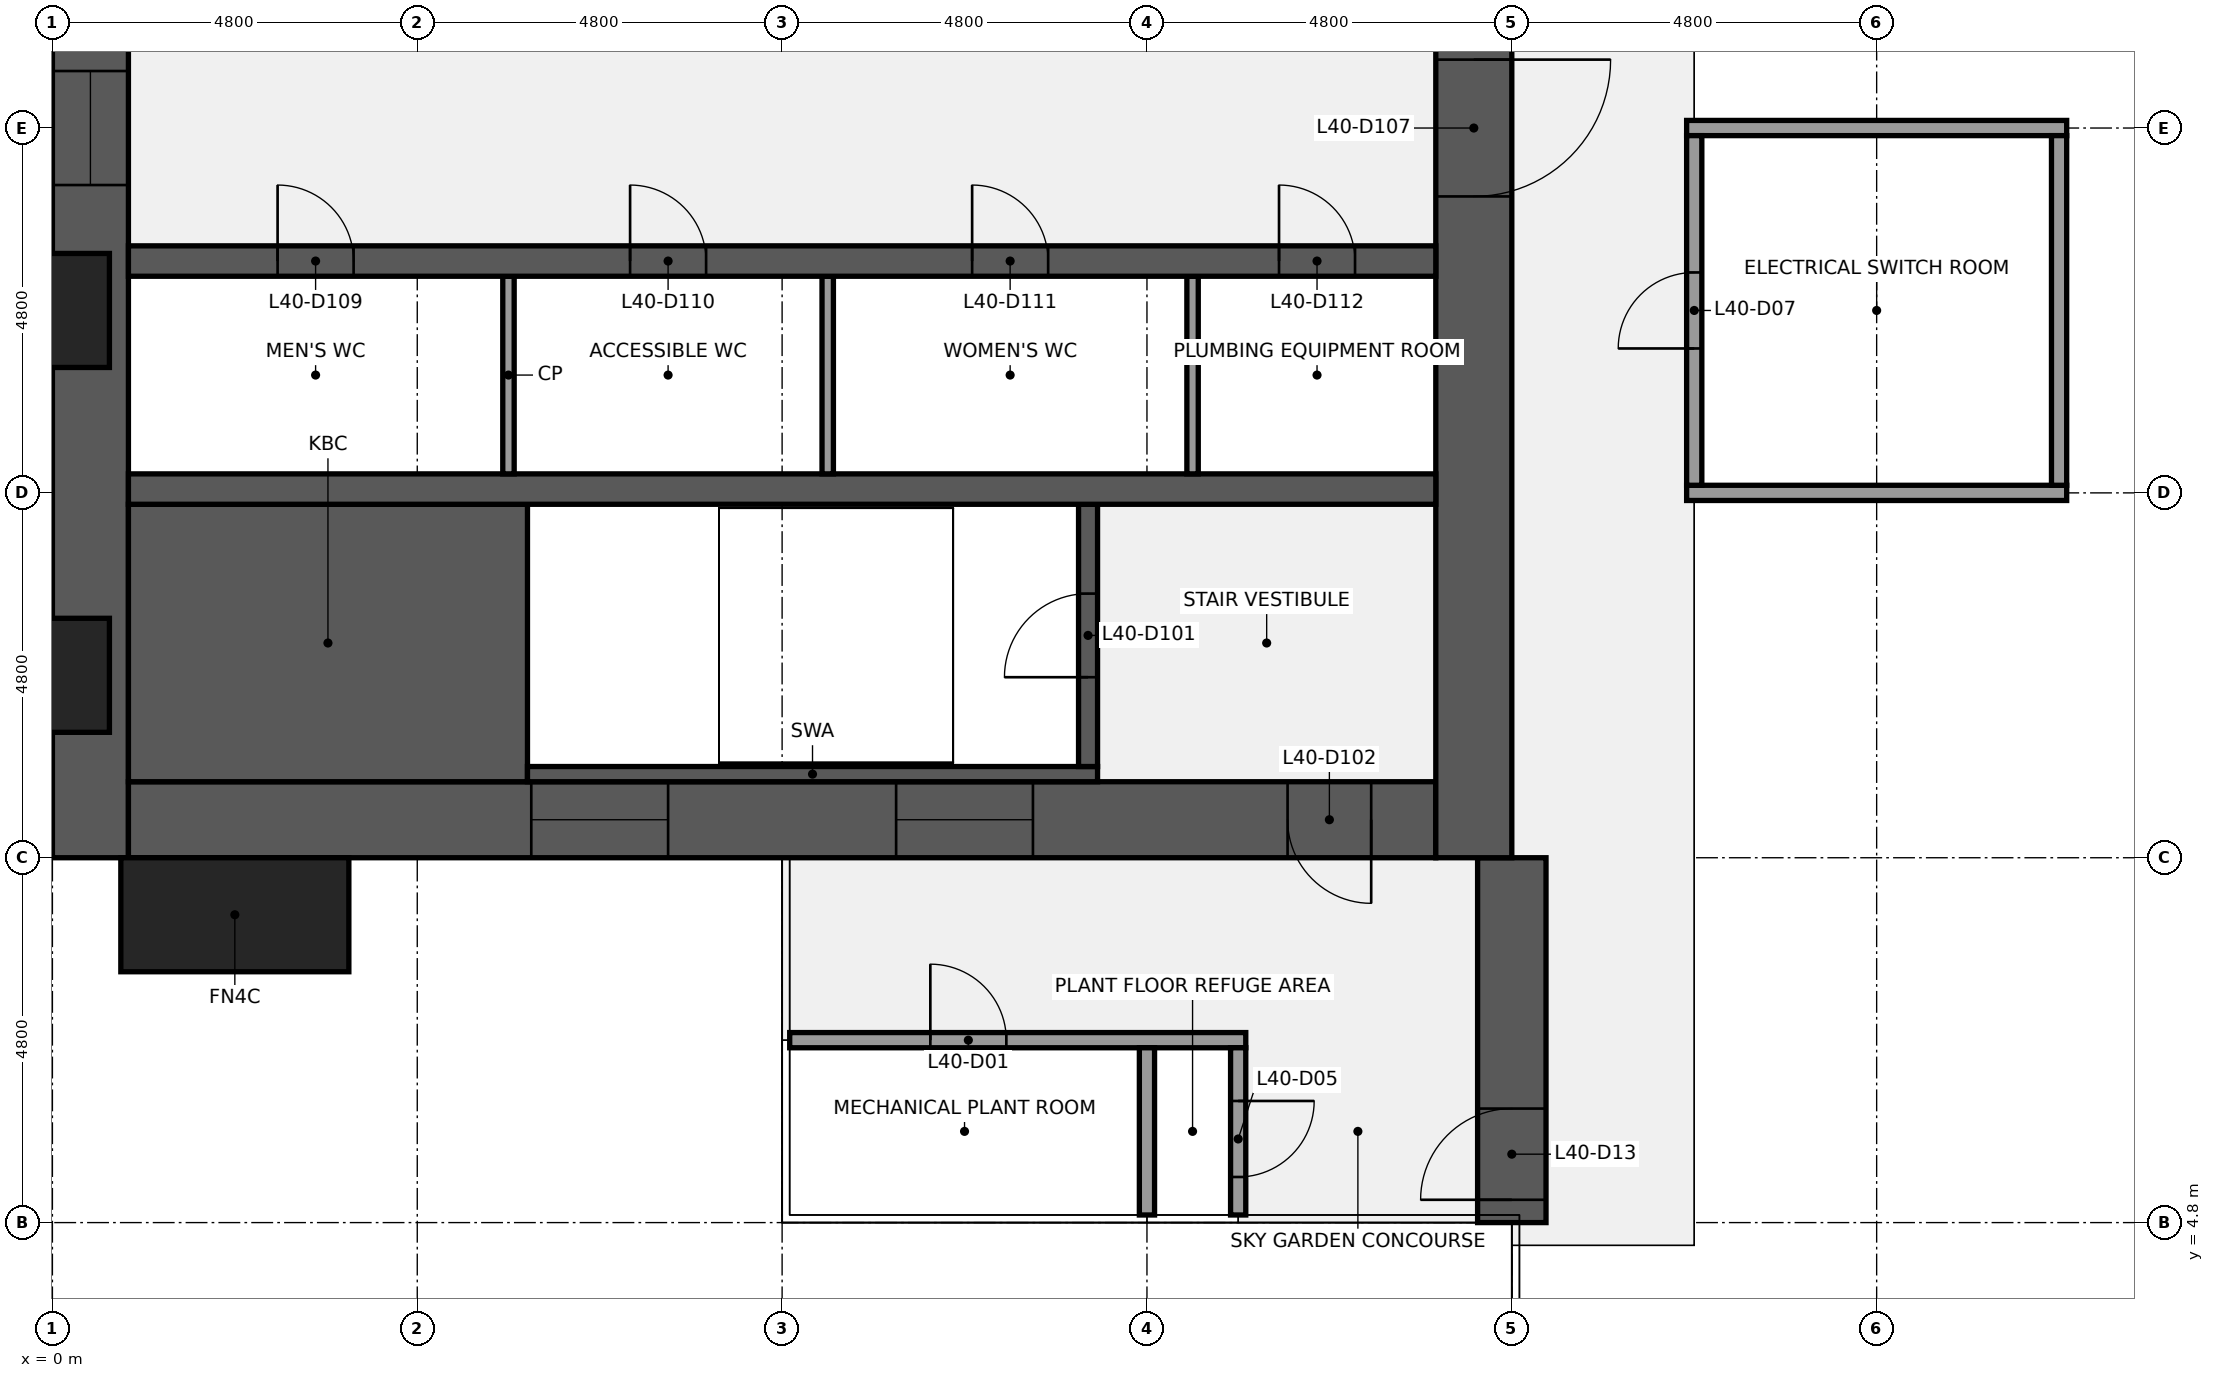
"""IFC4 building model, lengths in metres.
Left out: names, types, materials, properties, quantities, classifications, styles, units other than length and angle.
Written with IfcOpenShell. Run it as: python <this file> out.ifc"""

import sys

from ifc_helpers import new_model, si_unit, direction, frame, frame_2d, origin, origin_2d, place, context, subcontext, project, spatial, rectangle, extrude, element, fill, save


model = new_model("IFC4")
c1 = context("Model", 3, precision=1e-05, world=origin(), true_north=direction((0.0, 1.0)))
c2 = subcontext(c1, "Body", "Model", "MODEL_VIEW")
j1 = project(units=[si_unit("LENGTHUNIT", "METRE"), si_unit("PLANEANGLEUNIT", "RADIAN")], contexts=[c1])
p1 = place(None, origin())
s1 = spatial("IfcSite", under=j1, at=p1, CompositionType="ELEMENT")
p2 = place(p1, origin())
s2 = spatial("IfcBuilding", under=s1, at=p2, CompositionType="ELEMENT")
p3 = place(p2, frame((0.0, 0.0, 180.6)))
s3 = spatial("IfcBuildingStorey", under=s2, at=p3, CompositionType="ELEMENT", Elevation=180.6)
p4 = place(p3, frame((19.2, 4.8, 0.0), z_axis=(0.0, 0.0, 1.0), x_axis=(0.0, 1.0, 0.0)))
e1 = element("IfcWall", 1, at=p4, inside=s3, PredefinedType="SHEAR", context=c2, shape_type="SweptSolid", body=[
    extrude(rectangle(XDim=4.8, YDim=0.9, at=frame_2d((2.4, 0.0))), origin(), (0.0, 0.0, 1.0), 12.3),
])
p5 = place(p4, frame((0.3, 0.0, 0.0)))
e2 = element("IfcOpeningElement", 2, at=p5, cuts=e1, PredefinedType="OPENING", context=c2, shape_type="SweptSolid", body=[
    extrude(rectangle(XDim=1.2, YDim=2.1, at=frame_2d((0.6, 1.05))), frame((0.0, 0.46, 0.0), z_axis=(0.0, -1.0, 0.0), x_axis=(1.0, 0.0, 0.0)), (0.0, 0.0, 1.0), 0.92),
])
p6 = place(p3, frame((0.5, 9.6, 0.0), z_axis=(0.0, 0.0, 1.0), x_axis=(0.0, 1.0, 0.0)))
e3 = element("IfcWall", 3, at=p6, inside=s3, PredefinedType="SHEAR", context=c2, shape_type="SweptSolid", body=[
    extrude(rectangle(XDim=28.8, YDim=1.0, at=frame_2d((14.4, 0.0))), origin(), (0.0, 0.0, 1.0), 12.3),
])
p7 = place(p6, frame((8.85, 0.0, 0.9)))
e4 = element("IfcOpeningElement", 4, at=p7, cuts=e3, PredefinedType="OPENING", context=c2, shape_type="SweptSolid", body=[
    extrude(rectangle(XDim=1.5, YDim=6.3, at=frame_2d((0.75, 3.15))), frame((0.0, 0.51, 0.0), z_axis=(0.0, -1.0, 0.0), x_axis=(1.0, 0.0, 0.0)), (0.0, 0.0, 1.0), 1.02),
])
p8 = place(p6, frame((18.45, 0.0, 0.9)))
e5 = element("IfcOpeningElement", 5, at=p8, cuts=e3, PredefinedType="OPENING", context=c2, shape_type="SweptSolid", body=[
    extrude(rectangle(XDim=1.5, YDim=6.3, at=frame_2d((0.75, 3.15))), frame((0.0, 0.51, 0.0), z_axis=(0.0, -1.0, 0.0), x_axis=(1.0, 0.0, 0.0)), (0.0, 0.0, 1.0), 1.02),
])
p9 = place(p3, frame((18.2, 10.1, 0.0), z_axis=(0.0, 0.0, 1.0), x_axis=(-1.0, 0.0, 0.0)))
e6 = element("IfcWall", 6, at=p9, inside=s3, PredefinedType="SHEAR", context=c2, shape_type="SweptSolid", body=[
    extrude(rectangle(XDim=17.2, YDim=1.0, at=frame_2d((8.6, 0.0))), origin(), (0.0, 0.0, 1.0), 12.3),
])
p10 = place(p9, frame((0.85, 0.0, 0.0)))
e7 = element("IfcOpeningElement", 7, at=p10, cuts=e6, PredefinedType="OPENING", context=c2, shape_type="SweptSolid", body=[
    extrude(rectangle(XDim=1.1, YDim=2.1, at=frame_2d((0.55, 1.05))), frame((0.0, 0.51, 0.0), z_axis=(0.0, -1.0, 0.0), x_axis=(1.0, 0.0, 0.0)), (0.0, 0.0, 1.0), 1.02),
])
p11 = place(p9, frame((10.1, 0.0, 0.9)))
e8 = element("IfcOpeningElement", 8, at=p11, cuts=e6, PredefinedType="OPENING", context=c2, shape_type="SweptSolid", body=[
    extrude(rectangle(XDim=1.8, YDim=1.5, at=frame_2d((0.9, 0.75))), frame((0.0, 0.51, 0.0), z_axis=(0.0, -1.0, 0.0), x_axis=(1.0, 0.0, 0.0)), (0.0, 0.0, 1.0), 1.02),
])
p12 = place(p9, frame((5.3, 0.0, 0.9)))
e9 = element("IfcOpeningElement", 9, at=p12, cuts=e6, PredefinedType="OPENING", context=c2, shape_type="SweptSolid", body=[
    extrude(rectangle(XDim=1.8, YDim=1.5, at=frame_2d((0.9, 0.75))), frame((0.0, 0.51, 0.0), z_axis=(0.0, -1.0, 0.0), x_axis=(1.0, 0.0, 0.0)), (0.0, 0.0, 1.0), 1.02),
])
p13 = place(p3, frame((18.7, 38.4, 0.0), z_axis=(0.0, 0.0, 1.0), x_axis=(0.0, -1.0, 0.0)))
e10 = element("IfcWall", 10, at=p13, inside=s3, PredefinedType="SHEAR", context=c2, shape_type="SweptSolid", body=[
    extrude(rectangle(XDim=28.8, YDim=1.0, at=frame_2d((14.4, 0.0))), origin(), (0.0, 0.0, 1.0), 12.3),
])
p14 = place(p13, frame((18.3, 0.0, 0.0)))
e11 = element("IfcOpeningElement", 11, at=p14, cuts=e10, PredefinedType="OPENING", context=c2, shape_type="SweptSolid", body=[
    extrude(rectangle(XDim=1.8, YDim=2.1, at=frame_2d((0.9, 1.05))), frame((0.0, 0.51, 0.0), z_axis=(0.0, -1.0, 0.0), x_axis=(1.0, 0.0, 0.0)), (0.0, 0.0, 1.0), 1.02),
])
p15 = place(p13, frame((8.7, 0.0, 0.0)))
e12 = element("IfcOpeningElement", 12, at=p15, cuts=e10, PredefinedType="OPENING", context=c2, shape_type="SweptSolid", body=[
    extrude(rectangle(XDim=1.8, YDim=2.1, at=frame_2d((0.9, 1.05))), frame((0.0, 0.51, 0.0), z_axis=(0.0, -1.0, 0.0), x_axis=(1.0, 0.0, 0.0)), (0.0, 0.0, 1.0), 1.02),
])
p16 = place(p3, frame((1.0, 12.425, 0.0), z_axis=(0.0, 0.0, 1.0), x_axis=(1.0, 0.0, 0.0)))
e13 = element("IfcWall", 13, at=p16, inside=s3, PredefinedType="SHEAR", context=c2, shape_type="SweptSolid", body=[
    extrude(rectangle(XDim=5.25, YDim=3.65, at=frame_2d((2.625, 0.0))), origin(), (0.0, 0.0, 1.0), 12.3),
])
p17 = place(p3, frame((6.25, 10.7, 0.0), z_axis=(0.0, 0.0, 1.0), x_axis=(1.0, 0.0, 0.0)))
e14 = element("IfcWall", 14, at=p17, inside=s3, PredefinedType="SHEAR", context=c2, shape_type="SweptSolid", body=[
    extrude(rectangle(XDim=7.5, YDim=0.2, at=frame_2d((3.75, 0.0))), origin(), (0.0, 0.0, 1.0), 12.3),
])
p18 = place(p3, frame((13.625, 10.8, 0.0), z_axis=(0.0, 0.0, 1.0), x_axis=(0.0, 1.0, 0.0)))
e15 = element("IfcWall", 15, at=p18, inside=s3, PredefinedType="SHEAR", context=c2, shape_type="SweptSolid", body=[
    extrude(rectangle(XDim=3.45, YDim=0.25, at=frame_2d((1.725, 0.0))), origin(), (0.0, 0.0, 1.0), 12.3),
])
p19 = place(p18, frame((1.175, 0.0, 0.0)))
e16 = element("IfcOpeningElement", 16, at=p19, cuts=e15, PredefinedType="OPENING", context=c2, shape_type="SweptSolid", body=[
    extrude(rectangle(XDim=1.1, YDim=2.1, at=frame_2d((0.55, 1.05))), frame((0.0, 0.135, 0.0), z_axis=(0.0, -1.0, 0.0), x_axis=(1.0, 0.0, 0.0)), (0.0, 0.0, 1.0), 0.27),
])
p20 = place(p3, frame((1.0, 14.45, 0.0), z_axis=(0.0, 0.0, 1.0), x_axis=(1.0, 0.0, 0.0)))
e17 = element("IfcWall", 17, at=p20, inside=s3, PredefinedType="SHEAR", context=c2, shape_type="SweptSolid", body=[
    extrude(rectangle(XDim=17.2, YDim=0.4, at=frame_2d((8.6, 0.0))), origin(), (0.0, 0.0, 1.0), 12.3),
])
for number, where, z_axis, x_axis in (
    (18, (6.0, 14.65, 0.0), (0.0, 0.0, 1.0), (0.0, 1.0, 0.0)),
    (19, (10.2, 14.65, 0.0), (0.0, 0.0, 1.0), (0.0, 1.0, 0.0)),
    (20, (15.0, 14.65, 0.0), (0.0, 0.0, 1.0), (0.0, 1.0, 0.0)),
):
    element("IfcWall", number, at=place(p3, frame(where, z_axis=z_axis, x_axis=x_axis)), inside=s3, PredefinedType="PARTITIONING", context=c2, shape_type="SweptSolid", body=[
        extrude(rectangle(XDim=2.6, YDim=0.15, at=frame_2d((1.3, 0.0))), origin(), (0.0, 0.0, 1.0), 12.3),
    ])
p21 = place(p3, frame((1.0, 17.45, 0.0), z_axis=(0.0, 0.0, 1.0), x_axis=(1.0, 0.0, 0.0)))
e21 = element("IfcWall", 21, at=p21, inside=s3, PredefinedType="SHEAR", context=c2, shape_type="SweptSolid", body=[
    extrude(rectangle(XDim=17.2, YDim=0.4, at=frame_2d((8.6, 0.0))), origin(), (0.0, 0.0, 1.0), 12.3),
])
p22 = place(p21, frame((1.962, 0.0, 0.0)))
e22 = element("IfcOpeningElement", 22, at=p22, cuts=e21, PredefinedType="OPENING", context=c2, shape_type="SweptSolid", body=[
    extrude(rectangle(XDim=1.0, YDim=2.1, at=frame_2d((0.5, 1.05))), frame((0.0, 0.21, 0.0), z_axis=(0.0, -1.0, 0.0), x_axis=(1.0, 0.0, 0.0)), (0.0, 0.0, 1.0), 0.42),
])
p23 = place(p21, frame((6.6, 0.0, 0.0)))
e23 = element("IfcOpeningElement", 23, at=p23, cuts=e21, PredefinedType="OPENING", context=c2, shape_type="SweptSolid", body=[
    extrude(rectangle(XDim=1.0, YDim=2.1, at=frame_2d((0.5, 1.05))), frame((0.0, 0.21, 0.0), z_axis=(0.0, -1.0, 0.0), x_axis=(1.0, 0.0, 0.0)), (0.0, 0.0, 1.0), 0.42),
])
p24 = place(p21, frame((11.1, 0.0, 0.0)))
e24 = element("IfcOpeningElement", 24, at=p24, cuts=e21, PredefinedType="OPENING", context=c2, shape_type="SweptSolid", body=[
    extrude(rectangle(XDim=1.0, YDim=2.1, at=frame_2d((0.5, 1.05))), frame((0.0, 0.21, 0.0), z_axis=(0.0, -1.0, 0.0), x_axis=(1.0, 0.0, 0.0)), (0.0, 0.0, 1.0), 0.42),
])
p25 = place(p21, frame((15.137, 0.0, 0.0)))
e25 = element("IfcOpeningElement", 25, at=p25, cuts=e21, PredefinedType="OPENING", context=c2, shape_type="SweptSolid", body=[
    extrude(rectangle(XDim=1.0, YDim=2.1, at=frame_2d((0.5, 1.05))), frame((0.0, 0.21, 0.0), z_axis=(0.0, -1.0, 0.0), x_axis=(1.0, 0.0, 0.0)), (0.0, 0.0, 1.0), 0.42),
])
p26 = place(p3, frame((9.7, 7.2, 0.0), z_axis=(0.0, 0.0, 1.0), x_axis=(1.0, 0.0, 0.0)))
e26 = element("IfcWall", 26, at=p26, inside=s3, PredefinedType="PARTITIONING", context=c2, shape_type="SweptSolid", body=[
    extrude(rectangle(XDim=6.0, YDim=0.2, at=frame_2d((3.0, 0.0))), origin(), (0.0, 0.0, 1.0), 11.309),
])
p27 = place(p26, frame((1.85, 0.0, 0.0)))
e27 = element("IfcOpeningElement", 27, at=p27, cuts=e26, PredefinedType="OPENING", context=c2, shape_type="SweptSolid", body=[
    extrude(rectangle(XDim=1.0, YDim=2.1, at=frame_2d((0.5, 1.05))), frame((0.0, 0.11, 0.0), z_axis=(0.0, -1.0, 0.0), x_axis=(1.0, 0.0, 0.0)), (0.0, 0.0, 1.0), 0.22),
])
for number, where, z_axis, x_axis in (
    (28, (21.5, 14.4, 0.0), (0.0, 0.0, 1.0), (1.0, 0.0, 0.0)),
    (29, (21.5, 19.2, 0.0), (0.0, 0.0, 1.0), (1.0, 0.0, 0.0)),
):
    element("IfcWall", number, at=place(p3, frame(where, z_axis=z_axis, x_axis=x_axis)), inside=s3, PredefinedType="PARTITIONING", context=c2, shape_type="SweptSolid", body=[
        extrude(rectangle(XDim=5.0, YDim=0.2, at=frame_2d((2.5, 0.0))), origin(), (0.0, 0.0, 1.0), 11.309),
    ])
p28 = place(p3, frame((14.4, 4.9, 0.0), z_axis=(0.0, 0.0, 1.0), x_axis=(0.0, 1.0, 0.0)))
e30 = element("IfcWall", 30, at=p28, inside=s3, PredefinedType="PARTITIONING", context=c2, shape_type="SweptSolid", body=[
    extrude(rectangle(XDim=2.2, YDim=0.2, at=frame_2d((1.1, 0.0))), origin(), (0.0, 0.0, 1.0), 11.309),
])
p29 = place(p3, frame((15.6, 4.9, 0.0), z_axis=(0.0, 0.0, 1.0), x_axis=(0.0, 1.0, 0.0)))
e31 = element("IfcWall", 31, at=p29, inside=s3, PredefinedType="PARTITIONING", context=c2, shape_type="SweptSolid", body=[
    extrude(rectangle(XDim=2.2, YDim=0.2, at=frame_2d((1.1, 0.0))), origin(), (0.0, 0.0, 1.0), 11.309),
])
p30 = place(p29, frame((0.5, 0.0, 0.0)))
e32 = element("IfcOpeningElement", 32, at=p30, cuts=e31, PredefinedType="OPENING", context=c2, shape_type="SweptSolid", body=[
    extrude(rectangle(XDim=1.0, YDim=2.1, at=frame_2d((0.5, 1.05))), frame((0.0, 0.11, 0.0), z_axis=(0.0, -1.0, 0.0), x_axis=(1.0, 0.0, 0.0)), (0.0, 0.0, 1.0), 0.22),
])
p31 = place(p3, frame((21.6, 14.5, 0.0), z_axis=(0.0, 0.0, 1.0), x_axis=(0.0, 1.0, 0.0)))
e33 = element("IfcWall", 33, at=p31, inside=s3, PredefinedType="PARTITIONING", context=c2, shape_type="SweptSolid", body=[
    extrude(rectangle(XDim=4.6, YDim=0.2, at=frame_2d((2.3, 0.0))), origin(), (0.0, 0.0, 1.0), 11.309),
])
p32 = place(p31, frame((1.8, 0.0, 0.0)))
e34 = element("IfcOpeningElement", 34, at=p32, cuts=e33, PredefinedType="OPENING", context=c2, shape_type="SweptSolid", body=[
    extrude(rectangle(XDim=1.0, YDim=2.1, at=frame_2d((0.5, 1.05))), frame((0.0, 0.11, 0.0), z_axis=(0.0, -1.0, 0.0), x_axis=(1.0, 0.0, 0.0)), (0.0, 0.0, 1.0), 0.22),
])
p33 = place(p3, frame((26.4, 14.5, 0.0), z_axis=(0.0, 0.0, 1.0), x_axis=(0.0, 1.0, 0.0)))
e35 = element("IfcWall", 35, at=p33, inside=s3, PredefinedType="PARTITIONING", context=c2, shape_type="SweptSolid", body=[
    extrude(rectangle(XDim=4.6, YDim=0.2, at=frame_2d((2.3, 0.0))), origin(), (0.0, 0.0, 1.0), 11.309),
])
p34 = place(p3, frame((2.4, 8.85, 0.0), z_axis=(0.0, 0.0, 1.0), x_axis=(1.0, 0.0, 0.0)))
e36 = element("IfcColumn", 36, at=p34, inside=s3, PredefinedType="PILASTER", context=c2, shape_type="SweptSolid", body=[
    extrude(rectangle(XDim=3.0, YDim=1.5, at=origin_2d()), origin(), (0.0, 0.0, 1.0), 12.6),
])
p35 = place(p19, origin())
e37 = element("IfcDoor", 37, at=p35, inside=s3, OperationType="SINGLE_SWING_LEFT", PredefinedType="DOOR", context=c2, shape_type="SweptSolid", body=[
    extrude(rectangle(XDim=1.1, YDim=2.1, at=frame_2d((0.55, 1.05))), frame((0.0, 0.025, 0.0), z_axis=(0.0, -1.0, 0.0), x_axis=(1.0, 0.0, 0.0)), (0.0, 0.0, 1.0), 0.05),
])
fill(e16, e37)
p36 = place(p10, origin())
e38 = element("IfcDoor", 38, at=p36, inside=s3, OperationType="SINGLE_SWING_LEFT", PredefinedType="DOOR", context=c2, shape_type="SweptSolid", body=[
    extrude(rectangle(XDim=1.1, YDim=2.1, at=frame_2d((0.55, 1.05))), frame((0.0, 0.025, 0.0), z_axis=(0.0, -1.0, 0.0), x_axis=(1.0, 0.0, 0.0)), (0.0, 0.0, 1.0), 0.05),
])
fill(e7, e38)
p37 = place(p14, origin())
e39 = element("IfcDoor", 39, at=p37, inside=s3, OperationType="DOUBLE_DOOR_SINGLE_SWING", PredefinedType="DOOR", context=c2, shape_type="SweptSolid", body=[
    extrude(rectangle(XDim=1.8, YDim=2.1, at=frame_2d((0.9, 1.05))), frame((0.0, 0.025, 0.0), z_axis=(0.0, -1.0, 0.0), x_axis=(1.0, 0.0, 0.0)), (0.0, 0.0, 1.0), 0.05),
])
fill(e11, e39)
p38 = place(p22, origin())
e40 = element("IfcDoor", 40, at=p38, inside=s3, OperationType="SINGLE_SWING_LEFT", PredefinedType="DOOR", context=c2, shape_type="SweptSolid", body=[
    extrude(rectangle(XDim=1.0, YDim=2.1, at=frame_2d((0.5, 1.05))), frame((0.0, 0.025, 0.0), z_axis=(0.0, -1.0, 0.0), x_axis=(1.0, 0.0, 0.0)), (0.0, 0.0, 1.0), 0.05),
])
fill(e22, e40)
p39 = place(p23, origin())
e41 = element("IfcDoor", 41, at=p39, inside=s3, OperationType="SINGLE_SWING_LEFT", PredefinedType="DOOR", context=c2, shape_type="SweptSolid", body=[
    extrude(rectangle(XDim=1.0, YDim=2.1, at=frame_2d((0.5, 1.05))), frame((0.0, 0.025, 0.0), z_axis=(0.0, -1.0, 0.0), x_axis=(1.0, 0.0, 0.0)), (0.0, 0.0, 1.0), 0.05),
])
fill(e23, e41)
p40 = place(p24, origin())
e42 = element("IfcDoor", 42, at=p40, inside=s3, OperationType="SINGLE_SWING_LEFT", PredefinedType="DOOR", context=c2, shape_type="SweptSolid", body=[
    extrude(rectangle(XDim=1.0, YDim=2.1, at=frame_2d((0.5, 1.05))), frame((0.0, 0.025, 0.0), z_axis=(0.0, -1.0, 0.0), x_axis=(1.0, 0.0, 0.0)), (0.0, 0.0, 1.0), 0.05),
])
fill(e24, e42)
p41 = place(p25, origin())
e43 = element("IfcDoor", 43, at=p41, inside=s3, OperationType="SINGLE_SWING_LEFT", PredefinedType="DOOR", context=c2, shape_type="SweptSolid", body=[
    extrude(rectangle(XDim=1.0, YDim=2.1, at=frame_2d((0.5, 1.05))), frame((0.0, 0.025, 0.0), z_axis=(0.0, -1.0, 0.0), x_axis=(1.0, 0.0, 0.0)), (0.0, 0.0, 1.0), 0.05),
])
fill(e25, e43)
p42 = place(p7, origin())
e44 = element("IfcWindow", 44, at=p42, inside=s3, PartitioningType="SINGLE_PANEL", PredefinedType="WINDOW", context=c2, shape_type="SweptSolid", body=[
    extrude(rectangle(XDim=1.5, YDim=6.3, at=frame_2d((0.75, 3.15))), frame((0.0, 0.03, 0.0), z_axis=(0.0, -1.0, 0.0), x_axis=(1.0, 0.0, 0.0)), (0.0, 0.0, 1.0), 0.06),
])
fill(e4, e44)
p43 = place(p11, origin())
e45 = element("IfcWindow", 45, at=p43, inside=s3, PartitioningType="SINGLE_PANEL", PredefinedType="WINDOW", context=c2, shape_type="SweptSolid", body=[
    extrude(rectangle(XDim=1.8, YDim=1.5, at=frame_2d((0.9, 0.75))), frame((0.0, 0.03, 0.0), z_axis=(0.0, -1.0, 0.0), x_axis=(1.0, 0.0, 0.0)), (0.0, 0.0, 1.0), 0.06),
])
fill(e8, e45)
p44 = place(p12, origin())
e46 = element("IfcWindow", 46, at=p44, inside=s3, PartitioningType="SINGLE_PANEL", PredefinedType="WINDOW", context=c2, shape_type="SweptSolid", body=[
    extrude(rectangle(XDim=1.8, YDim=1.5, at=frame_2d((0.9, 0.75))), frame((0.0, 0.03, 0.0), z_axis=(0.0, -1.0, 0.0), x_axis=(1.0, 0.0, 0.0)), (0.0, 0.0, 1.0), 0.06),
])
fill(e9, e46)
p45 = place(p27, origin())
e47 = element("IfcDoor", 47, at=p45, inside=s3, OperationType="SINGLE_SWING_LEFT", PredefinedType="DOOR", context=c2, shape_type="SweptSolid", body=[
    extrude(rectangle(XDim=1.0, YDim=2.1, at=frame_2d((0.5, 1.05))), frame((0.0, 0.025, 0.0), z_axis=(0.0, -1.0, 0.0), x_axis=(1.0, 0.0, 0.0)), (0.0, 0.0, 1.0), 0.05),
])
fill(e27, e47)
p46 = place(p30, origin())
e48 = element("IfcDoor", 48, at=p46, inside=s3, OperationType="SINGLE_SWING_RIGHT", PredefinedType="DOOR", context=c2, shape_type="SweptSolid", body=[
    extrude(rectangle(XDim=1.0, YDim=2.1, at=frame_2d((0.5, 1.05))), frame((0.0, 0.025, 0.0), z_axis=(0.0, -1.0, 0.0), x_axis=(1.0, 0.0, 0.0)), (0.0, 0.0, 1.0), 0.05),
])
fill(e32, e48)
p47 = place(p32, origin())
e49 = element("IfcDoor", 49, at=p47, inside=s3, OperationType="SINGLE_SWING_LEFT", PredefinedType="DOOR", context=c2, shape_type="SweptSolid", body=[
    extrude(rectangle(XDim=1.0, YDim=2.1, at=frame_2d((0.5, 1.05))), frame((0.0, 0.025, 0.0), z_axis=(0.0, -1.0, 0.0), x_axis=(1.0, 0.0, 0.0)), (0.0, 0.0, 1.0), 0.05),
])
fill(e34, e49)
p48 = place(p5, origin())
e50 = element("IfcDoor", 50, at=p48, inside=s3, OperationType="SINGLE_SWING_LEFT", PredefinedType="DOOR", context=c2, shape_type="SweptSolid", body=[
    extrude(rectangle(XDim=1.2, YDim=2.1, at=frame_2d((0.6, 1.05))), frame((0.0, 0.025, 0.0), z_axis=(0.0, -1.0, 0.0), x_axis=(1.0, 0.0, 0.0)), (0.0, 0.0, 1.0), 0.05),
])
fill(e2, e50)
save(model, sys.argv[1])
